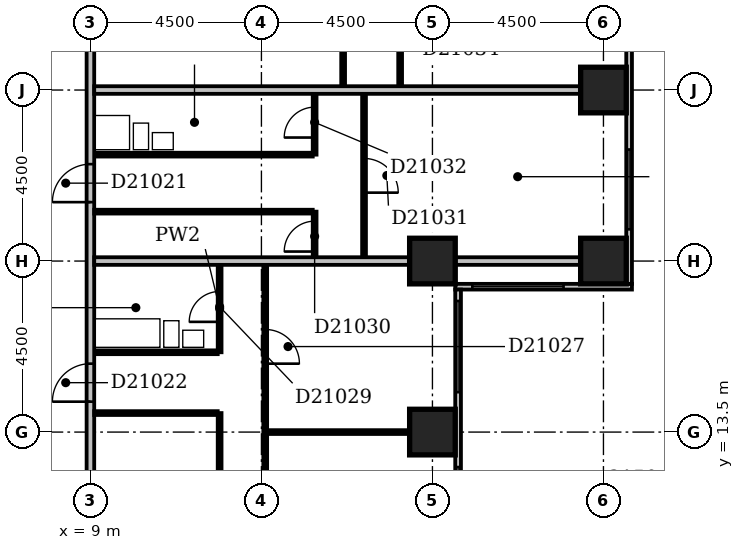
"""IFC4 building model, lengths in metres.
Left out: names, types, materials, properties, quantities, classifications, styles, units other than length and angle.
Written with IfcOpenShell. Run it as: python <this file> out.ifc"""

import sys

from ifc_helpers import new_model, si_unit, direction, frame, frame_2d, origin, origin_2d, place, context, subcontext, project, spatial, rectangle, extrude, element, fill, save


model = new_model("IFC4")
c1 = context("Model", 3, precision=1e-05, world=origin(), true_north=direction((0.0, 1.0)))
c2 = subcontext(c1, "Body", "Model", "MODEL_VIEW")
j1 = project(units=[si_unit("LENGTHUNIT", "METRE"), si_unit("PLANEANGLEUNIT", "RADIAN")], contexts=[c1])
p1 = place(None, origin())
s1 = spatial("IfcSite", under=j1, at=p1, CompositionType="ELEMENT")
p2 = place(p1, origin())
s2 = spatial("IfcBuilding", under=s1, at=p2, CompositionType="ELEMENT")
p3 = place(p2, frame((0.0, 0.0, 86.6)))
s3 = spatial("IfcBuildingStorey", under=s2, at=p3, CompositionType="ELEMENT", Elevation=86.6)
for number, where, z_axis, x_axis in (
    (1, (18.0, 13.5, -0.3), (0.0, 0.0, 1.0), (1.0, 0.0, 0.0)),
    (2, (18.0, 18.0, -0.3), (0.0, 0.0, 1.0), (1.0, 0.0, 0.0)),
    (3, (22.5, 18.0, -0.3), (0.0, 0.0, 1.0), (1.0, 0.0, 0.0)),
    (4, (22.5, 22.5, -0.3), (0.0, 0.0, 1.0), (1.0, 0.0, 0.0)),
):
    element("IfcColumn", number, at=place(p3, frame(where, z_axis=z_axis, x_axis=x_axis)), inside=s3, PredefinedType="COLUMN", context=c2, shape_type="SweptSolid", body=[
        extrude(rectangle(XDim=1.2, YDim=1.2, at=origin_2d()), origin(), (0.0, 0.0, 1.0), 3.6),
    ])
p4 = place(p3, frame((18.675, 8.4, 0.0), z_axis=(0.0, 0.0, 1.0), x_axis=(0.0, 1.0, 0.0)))
e5 = element("IfcWall", 5, at=p4, inside=s3, PredefinedType="STANDARD", context=c2, shape_type="SweptSolid", body=[
    extrude(rectangle(XDim=8.85, YDim=0.15, at=frame_2d((4.425, 0.0))), origin(), (0.0, 0.0, 1.0), 2.7),
])
p5 = place(p4, frame((1.401, 0.0, 0.6)))
e6 = element("IfcOpeningElement", 6, at=p5, cuts=e5, PredefinedType="OPENING", context=c2, shape_type="SweptSolid", body=[
    extrude(rectangle(XDim=0.45, YDim=1.8, at=frame_2d((0.225, 0.9))), frame((0.0, 0.087, 0.0), z_axis=(0.0, -1.0, 0.0), x_axis=(1.0, 0.0, 0.0)), (0.0, 0.0, 1.0), 0.174),
])
p6 = place(p4, frame((3.28, 0.0, 0.6)))
e7 = element("IfcOpeningElement", 7, at=p6, cuts=e5, PredefinedType="OPENING", context=c2, shape_type="SweptSolid", body=[
    extrude(rectangle(XDim=0.9, YDim=1.8, at=frame_2d((0.45, 0.9))), frame((0.0, 0.087, 0.0), z_axis=(0.0, -1.0, 0.0), x_axis=(1.0, 0.0, 0.0)), (0.0, 0.0, 1.0), 0.174),
])
p7 = place(p4, frame((6.15, 0.0, 0.6)))
e8 = element("IfcOpeningElement", 8, at=p7, cuts=e5, PredefinedType="OPENING", context=c2, shape_type="SweptSolid", body=[
    extrude(rectangle(XDim=2.4, YDim=1.8, at=frame_2d((1.2, 0.9))), frame((0.0, 0.087, 0.0), z_axis=(0.0, -1.0, 0.0), x_axis=(1.0, 0.0, 0.0)), (0.0, 0.0, 1.0), 0.174),
])
p8 = place(p3, frame((18.6, 17.325, 0.0), z_axis=(0.0, 0.0, 1.0), x_axis=(1.0, 0.0, 0.0)))
e9 = element("IfcWall", 9, at=p8, inside=s3, PredefinedType="STANDARD", context=c2, shape_type="SweptSolid", body=[
    extrude(rectangle(XDim=4.65, YDim=0.15, at=frame_2d((2.325, 0.0))), origin(), (0.0, 0.0, 1.0), 2.7),
])
p9 = place(p8, frame((0.45, 0.0, 0.6)))
e10 = element("IfcOpeningElement", 10, at=p9, cuts=e9, PredefinedType="OPENING", context=c2, shape_type="SweptSolid", body=[
    extrude(rectangle(XDim=2.4, YDim=1.8, at=frame_2d((1.2, 0.9))), frame((0.0, 0.087, 0.0), z_axis=(0.0, -1.0, 0.0), x_axis=(1.0, 0.0, 0.0)), (0.0, 0.0, 1.0), 0.174),
])
p10 = place(p3, frame((23.175, 17.4, 0.0), z_axis=(0.0, 0.0, 1.0), x_axis=(0.0, 1.0, 0.0)))
e11 = element("IfcWall", 11, at=p10, inside=s3, PredefinedType="STANDARD", context=c2, shape_type="SweptSolid", body=[
    extrude(rectangle(XDim=17.85, YDim=0.15, at=frame_2d((8.925, 0.0))), origin(), (0.0, 0.0, 1.0), 2.7),
])
p11 = place(p10, frame((1.435, 0.0, 0.6)))
e12 = element("IfcOpeningElement", 12, at=p11, cuts=e11, PredefinedType="OPENING", context=c2, shape_type="SweptSolid", body=[
    extrude(rectangle(XDim=2.1, YDim=1.8, at=frame_2d((1.05, 0.9))), frame((0.0, 0.087, 0.0), z_axis=(0.0, -1.0, 0.0), x_axis=(1.0, 0.0, 0.0)), (0.0, 0.0, 1.0), 0.174),
])
p12 = place(p10, frame((6.15, 0.0, 0.6)))
e13 = element("IfcOpeningElement", 13, at=p12, cuts=e11, PredefinedType="OPENING", context=c2, shape_type="SweptSolid", body=[
    extrude(rectangle(XDim=2.4, YDim=1.8, at=frame_2d((1.2, 0.9))), frame((0.0, 0.087, 0.0), z_axis=(0.0, -1.0, 0.0), x_axis=(1.0, 0.0, 0.0)), (0.0, 0.0, 1.0), 0.174),
])
p13 = place(p10, frame((10.65, 0.0, 0.6)))
e14 = element("IfcOpeningElement", 14, at=p13, cuts=e11, PredefinedType="OPENING", context=c2, shape_type="SweptSolid", body=[
    extrude(rectangle(XDim=2.4, YDim=1.8, at=frame_2d((1.2, 0.9))), frame((0.0, 0.087, 0.0), z_axis=(0.0, -1.0, 0.0), x_axis=(1.0, 0.0, 0.0)), (0.0, 0.0, 1.0), 0.174),
])
p14 = place(p10, frame((15.15, 0.0, 0.6)))
e15 = element("IfcOpeningElement", 15, at=p14, cuts=e11, PredefinedType="OPENING", context=c2, shape_type="SweptSolid", body=[
    extrude(rectangle(XDim=2.4, YDim=1.8, at=frame_2d((1.2, 0.9))), frame((0.0, 0.087, 0.0), z_axis=(0.0, -1.0, 0.0), x_axis=(1.0, 0.0, 0.0)), (0.0, 0.0, 1.0), 0.174),
])
p15 = place(p3, frame((9.0, 5.0, 0.0), z_axis=(0.0, 0.0, 1.0), x_axis=(0.0, 1.0, 0.0)))
e16 = element("IfcWall", 16, at=p15, inside=s3, PredefinedType="PARTITIONING", context=c2, shape_type="SweptSolid", body=[
    extrude(rectangle(XDim=44.5, YDim=0.2, at=frame_2d((22.25, 0.0))), origin(), (0.0, 0.0, 1.0), 3.3),
])
p16 = place(p15, frame((28.45, 0.0, 0.0)))
e17 = element("IfcOpeningElement", 17, at=p16, cuts=e16, PredefinedType="OPENING", context=c2, shape_type="SweptSolid", body=[
    extrude(rectangle(XDim=1.0, YDim=2.1, at=frame_2d((0.5, 1.05))), frame((0.0, 0.112, 0.0), z_axis=(0.0, -1.0, 0.0), x_axis=(1.0, 0.0, 0.0)), (0.0, 0.0, 1.0), 0.224),
])
p17 = place(p15, frame((22.8, 0.0, 0.0)))
e18 = element("IfcOpeningElement", 18, at=p17, cuts=e16, PredefinedType="OPENING", context=c2, shape_type="SweptSolid", body=[
    extrude(rectangle(XDim=1.0, YDim=2.1, at=frame_2d((0.5, 1.05))), frame((0.0, 0.112, 0.0), z_axis=(0.0, -1.0, 0.0), x_axis=(1.0, 0.0, 0.0)), (0.0, 0.0, 1.0), 0.224),
])
p18 = place(p15, frame((14.55, 0.0, 0.0)))
e19 = element("IfcOpeningElement", 19, at=p18, cuts=e16, PredefinedType="OPENING", context=c2, shape_type="SweptSolid", body=[
    extrude(rectangle(XDim=1.0, YDim=2.1, at=frame_2d((0.5, 1.05))), frame((0.0, 0.112, 0.0), z_axis=(0.0, -1.0, 0.0), x_axis=(1.0, 0.0, 0.0)), (0.0, 0.0, 1.0), 0.224),
])
p19 = place(p15, frame((9.3, 0.0, 0.0)))
e20 = element("IfcOpeningElement", 20, at=p19, cuts=e16, PredefinedType="OPENING", context=c2, shape_type="SweptSolid", body=[
    extrude(rectangle(XDim=1.0, YDim=2.1, at=frame_2d((0.5, 1.05))), frame((0.0, 0.112, 0.0), z_axis=(0.0, -1.0, 0.0), x_axis=(1.0, 0.0, 0.0)), (0.0, 0.0, 1.0), 0.224),
])
p20 = place(p15, frame((35.0, 0.0, 0.0)))
e21 = element("IfcOpeningElement", 21, at=p20, cuts=e16, PredefinedType="OPENING", context=c2, shape_type="SweptSolid", body=[
    extrude(rectangle(XDim=0.9, YDim=2.1, at=frame_2d((0.45, 1.05))), frame((0.0, 0.112, 0.0), z_axis=(0.0, -1.0, 0.0), x_axis=(1.0, 0.0, 0.0)), (0.0, 0.0, 1.0), 0.224),
])
p21 = place(p15, frame((1.5, 0.0, 0.0)))
e22 = element("IfcOpeningElement", 22, at=p21, cuts=e16, PredefinedType="OPENING", context=c2, shape_type="SweptSolid", body=[
    extrude(rectangle(XDim=0.9, YDim=2.1, at=frame_2d((0.45, 1.05))), frame((0.0, 0.112, 0.0), z_axis=(0.0, -1.0, 0.0), x_axis=(1.0, 0.0, 0.0)), (0.0, 0.0, 1.0), 0.224),
])
p22 = place(p3, frame((12.4, 9.1, 0.0), z_axis=(0.0, 0.0, 1.0), x_axis=(0.0, 1.0, 0.0)))
e23 = element("IfcWall", 23, at=p22, inside=s3, PredefinedType="PARTITIONING", context=c2, shape_type="SweptSolid", body=[
    extrude(rectangle(XDim=4.9, YDim=0.1, at=frame_2d((2.45, 0.0))), origin(), (0.0, 0.0, 1.0), 3.3),
])
p23 = place(p22, frame((1.95, 0.0, 0.0)))
e24 = element("IfcOpeningElement", 24, at=p23, cuts=e23, PredefinedType="OPENING", context=c2, shape_type="SweptSolid", body=[
    extrude(rectangle(XDim=0.9, YDim=2.1, at=frame_2d((0.45, 1.05))), frame((0.0, 0.062, 0.0), z_axis=(0.0, -1.0, 0.0), x_axis=(1.0, 0.0, 0.0)), (0.0, 0.0, 1.0), 0.124),
])
p24 = place(p3, frame((13.6, 9.6, 0.0), z_axis=(0.0, 0.0, 1.0), x_axis=(0.0, 1.0, 0.0)))
e25 = element("IfcWall", 25, at=p24, inside=s3, PredefinedType="PARTITIONING", context=c2, shape_type="SweptSolid", body=[
    extrude(rectangle(XDim=8.3, YDim=0.1, at=frame_2d((4.15, 0.0))), origin(), (0.0, 0.0, 1.0), 3.3),
])
p25 = place(p24, frame((1.2, 0.0, 0.0)))
e26 = element("IfcOpeningElement", 26, at=p25, cuts=e25, PredefinedType="OPENING", context=c2, shape_type="SweptSolid", body=[
    extrude(rectangle(XDim=0.9, YDim=2.1, at=frame_2d((0.45, 1.05))), frame((0.0, 0.062, 0.0), z_axis=(0.0, -1.0, 0.0), x_axis=(1.0, 0.0, 0.0)), (0.0, 0.0, 1.0), 0.124),
])
p26 = place(p24, frame((5.7, 0.0, 0.0)))
e27 = element("IfcOpeningElement", 27, at=p26, cuts=e25, PredefinedType="OPENING", context=c2, shape_type="SweptSolid", body=[
    extrude(rectangle(XDim=0.9, YDim=2.1, at=frame_2d((0.45, 1.05))), frame((0.0, 0.062, 0.0), z_axis=(0.0, -1.0, 0.0), x_axis=(1.0, 0.0, 0.0)), (0.0, 0.0, 1.0), 0.124),
])
p27 = place(p3, frame((13.65, 13.5, 0.0), z_axis=(0.0, 0.0, 1.0), x_axis=(1.0, 0.0, 0.0)))
e28 = element("IfcWall", 28, at=p27, inside=s3, PredefinedType="PARTITIONING", context=c2, shape_type="SweptSolid", body=[
    extrude(rectangle(XDim=3.75, YDim=0.1, at=frame_2d((1.875, 0.0))), origin(), (0.0, 0.0, 1.0), 3.3),
])
p28 = place(p3, frame((9.1, 14.0, 0.0), z_axis=(0.0, 0.0, 1.0), x_axis=(1.0, 0.0, 0.0)))
e29 = element("IfcWall", 29, at=p28, inside=s3, PredefinedType="PARTITIONING", context=c2, shape_type="SweptSolid", body=[
    extrude(rectangle(XDim=3.25, YDim=0.1, at=frame_2d((1.625, 0.0))), origin(), (0.0, 0.0, 1.0), 3.3),
])
p29 = place(p3, frame((9.1, 15.6, 0.0), z_axis=(0.0, 0.0, 1.0), x_axis=(1.0, 0.0, 0.0)))
e30 = element("IfcWall", 30, at=p29, inside=s3, PredefinedType="PLUMBINGWALL", context=c2, shape_type="SweptSolid", body=[
    extrude(rectangle(XDim=3.25, YDim=0.1, at=frame_2d((1.625, 0.0))), origin(), (0.0, 0.0, 1.0), 3.3),
])
p30 = place(p3, frame((12.4, 15.6, 0.0), z_axis=(0.0, 0.0, 1.0), x_axis=(0.0, 1.0, 0.0)))
e31 = element("IfcWall", 31, at=p30, inside=s3, PredefinedType="PARTITIONING", context=c2, shape_type="SweptSolid", body=[
    extrude(rectangle(XDim=2.3, YDim=0.1, at=frame_2d((1.15, 0.0))), origin(), (0.0, 0.0, 1.0), 3.3),
])
p31 = place(p30, frame((0.8, 0.0, 0.0)))
e32 = element("IfcOpeningElement", 32, at=p31, cuts=e31, PredefinedType="OPENING", context=c2, shape_type="SweptSolid", body=[
    extrude(rectangle(XDim=0.8, YDim=2.1, at=frame_2d((0.4, 1.05))), frame((0.0, 0.062, 0.0), z_axis=(0.0, -1.0, 0.0), x_axis=(1.0, 0.0, 0.0)), (0.0, 0.0, 1.0), 0.124),
])
p32 = place(p3, frame((9.1, 18.0, 0.0), z_axis=(0.0, 0.0, 1.0), x_axis=(1.0, 0.0, 0.0)))
e33 = element("IfcWall", 33, at=p32, inside=s3, PredefinedType="PARTITIONING", context=c2, shape_type="SweptSolid", body=[
    extrude(rectangle(XDim=8.3, YDim=0.2, at=frame_2d((4.15, 0.0))), origin(), (0.0, 0.0, 1.0), 2.6),
])
p33 = place(p3, frame((18.6, 18.0, 0.0), z_axis=(0.0, 0.0, 1.0), x_axis=(1.0, 0.0, 0.0)))
e34 = element("IfcWall", 34, at=p33, inside=s3, PredefinedType="PARTITIONING", context=c2, shape_type="SweptSolid", body=[
    extrude(rectangle(XDim=3.3, YDim=0.2, at=frame_2d((1.65, 0.0))), origin(), (0.0, 0.0, 1.0), 2.7),
])
p34 = place(p3, frame((14.9, 18.1, 0.0), z_axis=(0.0, 0.0, 1.0), x_axis=(0.0, 1.0, 0.0)))
e35 = element("IfcWall", 35, at=p34, inside=s3, PredefinedType="PARTITIONING", context=c2, shape_type="SweptSolid", body=[
    extrude(rectangle(XDim=1.2, YDim=0.1, at=frame_2d((0.6, 0.0))), origin(), (0.0, 0.0, 1.0), 3.3),
])
p35 = place(p34, frame((0.15, 0.0, 0.0)))
e36 = element("IfcOpeningElement", 36, at=p35, cuts=e35, PredefinedType="OPENING", context=c2, shape_type="SweptSolid", body=[
    extrude(rectangle(XDim=0.8, YDim=2.1, at=frame_2d((0.4, 1.05))), frame((0.0, 0.062, 0.0), z_axis=(0.0, -1.0, 0.0), x_axis=(1.0, 0.0, 0.0)), (0.0, 0.0, 1.0), 0.124),
])
p36 = place(p3, frame((16.2, 18.1, 0.0), z_axis=(0.0, 0.0, 1.0), x_axis=(0.0, 1.0, 0.0)))
e37 = element("IfcWall", 37, at=p36, inside=s3, PredefinedType="PARTITIONING", context=c2, shape_type="SweptSolid", body=[
    extrude(rectangle(XDim=4.3, YDim=0.1, at=frame_2d((2.15, 0.0))), origin(), (0.0, 0.0, 1.0), 3.3),
])
p37 = place(p36, frame((1.7, 0.0, 0.0)))
e38 = element("IfcOpeningElement", 38, at=p37, cuts=e37, PredefinedType="OPENING", context=c2, shape_type="SweptSolid", body=[
    extrude(rectangle(XDim=0.9, YDim=2.1, at=frame_2d((0.45, 1.05))), frame((0.0, 0.062, 0.0), z_axis=(0.0, -1.0, 0.0), x_axis=(1.0, 0.0, 0.0)), (0.0, 0.0, 1.0), 0.124),
])
p38 = place(p3, frame((9.1, 19.3, 0.0), z_axis=(0.0, 0.0, 1.0), x_axis=(1.0, 0.0, 0.0)))
e39 = element("IfcWall", 39, at=p38, inside=s3, PredefinedType="PARTITIONING", context=c2, shape_type="SweptSolid", body=[
    extrude(rectangle(XDim=5.75, YDim=0.1, at=frame_2d((2.875, 0.0))), origin(), (0.0, 0.0, 1.0), 3.3),
])
p39 = place(p3, frame((9.1, 20.8, 0.0), z_axis=(0.0, 0.0, 1.0), x_axis=(1.0, 0.0, 0.0)))
e40 = element("IfcWall", 40, at=p39, inside=s3, PredefinedType="PLUMBINGWALL", context=c2, shape_type="SweptSolid", body=[
    extrude(rectangle(XDim=5.75, YDim=0.1, at=frame_2d((2.875, 0.0))), origin(), (0.0, 0.0, 1.0), 3.3),
])
p40 = place(p3, frame((14.9, 20.8, 0.0), z_axis=(0.0, 0.0, 1.0), x_axis=(0.0, 1.0, 0.0)))
e41 = element("IfcWall", 41, at=p40, inside=s3, PredefinedType="PARTITIONING", context=c2, shape_type="SweptSolid", body=[
    extrude(rectangle(XDim=1.6, YDim=0.1, at=frame_2d((0.8, 0.0))), origin(), (0.0, 0.0, 1.0), 3.3),
])
p41 = place(p40, frame((0.45, 0.0, 0.0)))
e42 = element("IfcOpeningElement", 42, at=p41, cuts=e41, PredefinedType="OPENING", context=c2, shape_type="SweptSolid", body=[
    extrude(rectangle(XDim=0.8, YDim=2.1, at=frame_2d((0.4, 1.05))), frame((0.0, 0.062, 0.0), z_axis=(0.0, -1.0, 0.0), x_axis=(1.0, 0.0, 0.0)), (0.0, 0.0, 1.0), 0.124),
])
p42 = place(p3, frame((9.1, 22.5, 0.0), z_axis=(0.0, 0.0, 1.0), x_axis=(1.0, 0.0, 0.0)))
e43 = element("IfcWall", 43, at=p42, inside=s3, PredefinedType="PARTITIONING", context=c2, shape_type="SweptSolid", body=[
    extrude(rectangle(XDim=12.8, YDim=0.2, at=frame_2d((6.4, 0.0))), origin(), (0.0, 0.0, 1.0), 3.3),
])
p43 = place(p3, frame((15.65, 22.6, 0.0), z_axis=(0.0, 0.0, 1.0), x_axis=(0.0, 1.0, 0.0)))
e44 = element("IfcWall", 44, at=p43, inside=s3, PredefinedType="PARTITIONING", context=c2, shape_type="SweptSolid", body=[
    extrude(rectangle(XDim=4.9, YDim=0.1, at=frame_2d((2.45, 0.0))), origin(), (0.0, 0.0, 1.0), 3.3),
])
p44 = place(p43, frame((1.95, 0.0, 0.0)))
e45 = element("IfcOpeningElement", 45, at=p44, cuts=e44, PredefinedType="OPENING", context=c2, shape_type="SweptSolid", body=[
    extrude(rectangle(XDim=0.9, YDim=2.1, at=frame_2d((0.45, 1.05))), frame((0.0, 0.062, 0.0), z_axis=(0.0, -1.0, 0.0), x_axis=(1.0, 0.0, 0.0)), (0.0, 0.0, 1.0), 0.124),
])
p45 = place(p3, frame((17.15, 22.6, 0.0), z_axis=(0.0, 0.0, 1.0), x_axis=(0.0, 1.0, 0.0)))
e46 = element("IfcWall", 46, at=p45, inside=s3, PredefinedType="PARTITIONING", context=c2, shape_type="SweptSolid", body=[
    extrude(rectangle(XDim=8.8, YDim=0.1, at=frame_2d((4.4, 0.0))), origin(), (0.0, 0.0, 1.0), 3.3),
])
p46 = place(p45, frame((1.7, 0.0, 0.0)))
e47 = element("IfcOpeningElement", 47, at=p46, cuts=e46, PredefinedType="OPENING", context=c2, shape_type="SweptSolid", body=[
    extrude(rectangle(XDim=0.9, YDim=2.1, at=frame_2d((0.45, 1.05))), frame((0.0, 0.062, 0.0), z_axis=(0.0, -1.0, 0.0), x_axis=(1.0, 0.0, 0.0)), (0.0, 0.0, 1.0), 0.124),
])
p47 = place(p45, frame((5.05, 0.0, 0.0)))
e48 = element("IfcOpeningElement", 48, at=p47, cuts=e46, PredefinedType="OPENING", context=c2, shape_type="SweptSolid", body=[
    extrude(rectangle(XDim=0.9, YDim=2.1, at=frame_2d((0.45, 1.05))), frame((0.0, 0.062, 0.0), z_axis=(0.0, -1.0, 0.0), x_axis=(1.0, 0.0, 0.0)), (0.0, 0.0, 1.0), 0.124),
])
p48 = place(p6, origin())
e49 = element("IfcWindow", 49, at=p48, inside=s3, PartitioningType="SINGLE_PANEL", PredefinedType="WINDOW", context=c2, shape_type="SweptSolid", body=[
    extrude(rectangle(XDim=0.9, YDim=1.8, at=frame_2d((0.45, 0.9))), frame((0.0, 0.03, 0.0), z_axis=(0.0, -1.0, 0.0), x_axis=(1.0, 0.0, 0.0)), (0.0, 0.0, 1.0), 0.06),
])
fill(e7, e49)
p49 = place(p7, origin())
e50 = element("IfcWindow", 50, at=p49, inside=s3, PartitioningType="SINGLE_PANEL", PredefinedType="WINDOW", context=c2, shape_type="SweptSolid", body=[
    extrude(rectangle(XDim=2.4, YDim=1.8, at=frame_2d((1.2, 0.9))), frame((0.0, 0.03, 0.0), z_axis=(0.0, -1.0, 0.0), x_axis=(1.0, 0.0, 0.0)), (0.0, 0.0, 1.0), 0.06),
])
fill(e8, e50)
p50 = place(p9, origin())
e51 = element("IfcWindow", 51, at=p50, inside=s3, PartitioningType="SINGLE_PANEL", PredefinedType="WINDOW", context=c2, shape_type="SweptSolid", body=[
    extrude(rectangle(XDim=2.4, YDim=1.8, at=frame_2d((1.2, 0.9))), frame((0.0, 0.03, 0.0), z_axis=(0.0, -1.0, 0.0), x_axis=(1.0, 0.0, 0.0)), (0.0, 0.0, 1.0), 0.06),
])
fill(e10, e51)
p51 = place(p11, origin())
e52 = element("IfcWindow", 52, at=p51, inside=s3, PartitioningType="SINGLE_PANEL", PredefinedType="WINDOW", context=c2, shape_type="SweptSolid", body=[
    extrude(rectangle(XDim=2.1, YDim=1.8, at=frame_2d((1.05, 0.9))), frame((0.0, 0.03, 0.0), z_axis=(0.0, -1.0, 0.0), x_axis=(1.0, 0.0, 0.0)), (0.0, 0.0, 1.0), 0.06),
])
fill(e12, e52)
p52 = place(p18, origin())
e53 = element("IfcDoor", 53, at=p52, inside=s3, OperationType="SINGLE_SWING_LEFT", PredefinedType="DOOR", context=c2, shape_type="SweptSolid", body=[
    extrude(rectangle(XDim=1.0, YDim=2.1, at=frame_2d((0.5, 1.05))), frame((0.0, 0.025, 0.0), z_axis=(0.0, -1.0, 0.0), x_axis=(1.0, 0.0, 0.0)), (0.0, 0.0, 1.0), 0.05),
])
fill(e19, e53)
p53 = place(p19, origin())
e54 = element("IfcDoor", 54, at=p53, inside=s3, OperationType="SINGLE_SWING_LEFT", PredefinedType="DOOR", context=c2, shape_type="SweptSolid", body=[
    extrude(rectangle(XDim=1.0, YDim=2.1, at=frame_2d((0.5, 1.05))), frame((0.0, 0.025, 0.0), z_axis=(0.0, -1.0, 0.0), x_axis=(1.0, 0.0, 0.0)), (0.0, 0.0, 1.0), 0.05),
])
fill(e20, e54)
p54 = place(p26, frame((0.9, 0.0, 0.0), z_axis=(0.0, 0.0, 1.0), x_axis=(-1.0, 0.0, 0.0)))
e55 = element("IfcDoor", 55, at=p54, inside=s3, OperationType="SINGLE_SWING_RIGHT", PredefinedType="DOOR", context=c2, shape_type="SweptSolid", body=[
    extrude(rectangle(XDim=0.9, YDim=2.1, at=frame_2d((0.45, 1.05))), frame((0.0, 0.025, 0.0), z_axis=(0.0, -1.0, 0.0), x_axis=(1.0, 0.0, 0.0)), (0.0, 0.0, 1.0), 0.05),
])
fill(e27, e55)
p55 = place(p31, origin())
e56 = element("IfcDoor", 56, at=p55, inside=s3, OperationType="SINGLE_SWING_LEFT", PredefinedType="DOOR", context=c2, shape_type="SweptSolid", body=[
    extrude(rectangle(XDim=0.8, YDim=2.1, at=frame_2d((0.4, 1.05))), frame((0.0, 0.025, 0.0), z_axis=(0.0, -1.0, 0.0), x_axis=(1.0, 0.0, 0.0)), (0.0, 0.0, 1.0), 0.05),
])
fill(e32, e56)
p56 = place(p35, origin())
e57 = element("IfcDoor", 57, at=p56, inside=s3, OperationType="SINGLE_SWING_LEFT", PredefinedType="DOOR", context=c2, shape_type="SweptSolid", body=[
    extrude(rectangle(XDim=0.8, YDim=2.1, at=frame_2d((0.4, 1.05))), frame((0.0, 0.025, 0.0), z_axis=(0.0, -1.0, 0.0), x_axis=(1.0, 0.0, 0.0)), (0.0, 0.0, 1.0), 0.05),
])
fill(e36, e57)
p57 = place(p37, frame((0.9, 0.0, 0.0), z_axis=(0.0, 0.0, 1.0), x_axis=(-1.0, 0.0, 0.0)))
e58 = element("IfcDoor", 58, at=p57, inside=s3, OperationType="SINGLE_SWING_RIGHT", PredefinedType="DOOR", context=c2, shape_type="SweptSolid", body=[
    extrude(rectangle(XDim=0.9, YDim=2.1, at=frame_2d((0.45, 1.05))), frame((0.0, 0.025, 0.0), z_axis=(0.0, -1.0, 0.0), x_axis=(1.0, 0.0, 0.0)), (0.0, 0.0, 1.0), 0.05),
])
fill(e38, e58)
p58 = place(p41, origin())
e59 = element("IfcDoor", 59, at=p58, inside=s3, OperationType="SINGLE_SWING_LEFT", PredefinedType="DOOR", context=c2, shape_type="SweptSolid", body=[
    extrude(rectangle(XDim=0.8, YDim=2.1, at=frame_2d((0.4, 1.05))), frame((0.0, 0.025, 0.0), z_axis=(0.0, -1.0, 0.0), x_axis=(1.0, 0.0, 0.0)), (0.0, 0.0, 1.0), 0.05),
])
fill(e42, e59)
save(model, sys.argv[1])
